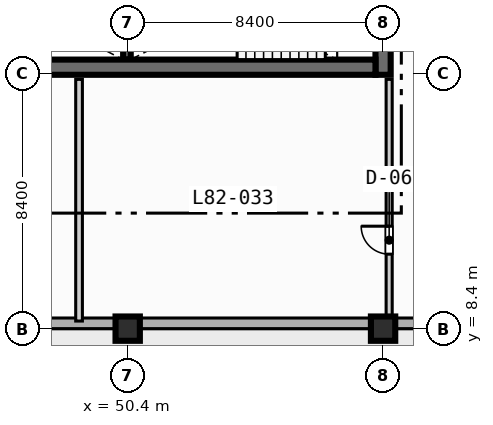
"""IFC4 building model, lengths in metres.
Left out: names, types, materials, properties, quantities, classifications, styles, units other than length and angle.
Written with IfcOpenShell. Run it as: python <this file> out.ifc"""

import sys

from ifc_helpers import new_model, si_unit, direction, frame, frame_2d, origin, origin_2d, place, context, subcontext, project, spatial, rectangle, extrude, element, fill, save


model = new_model("IFC4")
c1 = context("Model", 3, precision=1e-05, world=origin(), true_north=direction((0.0, 1.0)))
c2 = subcontext(c1, "Body", "Model", "MODEL_VIEW")
j1 = project(units=[si_unit("LENGTHUNIT", "METRE"), si_unit("PLANEANGLEUNIT", "RADIAN")], contexts=[c1])
p1 = place(None, origin())
s1 = spatial("IfcSite", under=j1, at=p1, CompositionType="ELEMENT")
p2 = place(p1, origin())
s2 = spatial("IfcBuilding", under=s1, at=p2, CompositionType="ELEMENT")
p3 = place(p2, frame((0.0, 0.0, 332.0)))
s3 = spatial("IfcBuildingStorey", under=s2, at=p3, CompositionType="ELEMENT", Elevation=332.0)
p4 = place(p3, frame((50.375, 17.25, 0.0), z_axis=(0.0, 0.0, 1.0), x_axis=(0.0, 1.0, 0.0)))
e1 = element("IfcWall", 1, at=p4, inside=s3, PredefinedType="SOLIDWALL", context=c2, shape_type="SweptSolid", body=[
    extrude(rectangle(XDim=3.5, YDim=0.25, at=frame_2d((1.75, 0.0))), origin(), (0.0, 0.0, 1.0), 3.67),
])
p5 = place(p3, frame((58.8, 16.75, 0.0), z_axis=(0.0, 0.0, 1.0), x_axis=(0.0, 1.0, 0.0)))
e2 = element("IfcWall", 2, at=p5, inside=s3, PredefinedType="SHEAR", context=c2, shape_type="SweptSolid", body=[
    extrude(rectangle(XDim=1.25, YDim=0.5, at=frame_2d((0.625, 0.0))), origin(), (0.0, 0.0, 1.0), 3.67),
])
p6 = place(p3, frame((42.2, 17.0, 0.0), z_axis=(0.0, 0.0, 1.0), x_axis=(1.0, 0.0, 0.0)))
e3 = element("IfcWall", 3, at=p6, inside=s3, PredefinedType="SHEAR", context=c2, shape_type="SweptSolid", body=[
    extrude(rectangle(XDim=16.35, YDim=0.5, at=frame_2d((8.175, 0.0))), origin(), (0.0, 0.0, 1.0), 3.67),
])
for number, where, z_axis, x_axis in (
    (4, (50.4, 8.4, 0.0), (0.0, 0.0, 1.0), (1.0, 0.0, 0.0)),
    (5, (58.8, 8.4, 0.0), (0.0, 0.0, 1.0), (1.0, 0.0, 0.0)),
):
    element("IfcColumn", number, at=place(p3, frame(where, z_axis=z_axis, x_axis=x_axis)), inside=s3, PredefinedType="COLUMN", context=c2, shape_type="SweptSolid", body=[
        extrude(rectangle(XDim=0.8, YDim=0.8, at=origin_2d()), origin(), (0.0, 0.0, 1.0), 3.9),
    ])
p7 = place(p3, frame((64.025, 8.575, 0.0), z_axis=(0.0, 0.0, 1.0), x_axis=(-1.0, 0.0, 0.0)))
e6 = element("IfcWall", 6, at=p7, inside=s3, PredefinedType="STANDARD", context=c2, shape_type="SweptSolid", body=[
    extrude(rectangle(XDim=52.45, YDim=0.35, at=frame_2d((26.225, 0.0))), origin(), (0.0, 0.0, 1.0), 3.67),
])
p8 = place(p7, frame((32.925, 0.0, 0.0)))
e7 = element("IfcOpeningElement", 7, at=p8, cuts=e6, PredefinedType="OPENING", context=c2, shape_type="SweptSolid", body=[
    extrude(rectangle(XDim=1.4, YDim=2.2, at=frame_2d((0.7, 1.1))), frame((0.0, 0.185, 0.0), z_axis=(0.0, -1.0, 0.0), x_axis=(1.0, 0.0, 0.0)), (0.0, 0.0, 1.0), 0.37),
])
p9 = place(p7, frame((41.825, 0.0, 0.85)))
e8 = element("IfcOpeningElement", 8, at=p9, cuts=e6, PredefinedType="OPENING", context=c2, shape_type="SweptSolid", body=[
    extrude(rectangle(XDim=2.4, YDim=1.95, at=frame_2d((1.2, 0.975))), frame((0.0, 0.185, 0.0), z_axis=(0.0, -1.0, 0.0), x_axis=(1.0, 0.0, 0.0)), (0.0, 0.0, 1.0), 0.37),
])
p10 = place(p7, frame((25.025, 0.0, 0.85)))
e9 = element("IfcOpeningElement", 9, at=p10, cuts=e6, PredefinedType="OPENING", context=c2, shape_type="SweptSolid", body=[
    extrude(rectangle(XDim=2.4, YDim=1.95, at=frame_2d((1.2, 0.975))), frame((0.0, 0.185, 0.0), z_axis=(0.0, -1.0, 0.0), x_axis=(1.0, 0.0, 0.0)), (0.0, 0.0, 1.0), 0.37),
])
p11 = place(p7, frame((16.925, 0.0, 0.85)))
e10 = element("IfcOpeningElement", 10, at=p11, cuts=e6, PredefinedType="OPENING", context=c2, shape_type="SweptSolid", body=[
    extrude(rectangle(XDim=1.8, YDim=1.8, at=frame_2d((0.9, 0.9))), frame((0.0, 0.185, 0.0), z_axis=(0.0, -1.0, 0.0), x_axis=(1.0, 0.0, 0.0)), (0.0, 0.0, 1.0), 0.37),
])
p12 = place(p7, frame((49.75, 0.0, 0.85)))
e11 = element("IfcOpeningElement", 11, at=p12, cuts=e6, PredefinedType="OPENING", context=c2, shape_type="SweptSolid", body=[
    extrude(rectangle(XDim=1.8, YDim=1.8, at=frame_2d((0.9, 0.9))), frame((0.0, 0.185, 0.0), z_axis=(0.0, -1.0, 0.0), x_axis=(1.0, 0.0, 0.0)), (0.0, 0.0, 1.0), 0.37),
])
p13 = place(p7, frame((47.89, 0.0, 0.85)))
e12 = element("IfcOpeningElement", 12, at=p13, cuts=e6, PredefinedType="OPENING", context=c2, shape_type="SweptSolid", body=[
    extrude(rectangle(XDim=0.72, YDim=1.8, at=frame_2d((0.36, 0.9))), frame((0.0, 0.185, 0.0), z_axis=(0.0, -1.0, 0.0), x_axis=(1.0, 0.0, 0.0)), (0.0, 0.0, 1.0), 0.37),
])
p14 = place(p7, frame((35.75, 0.0, 0.85)))
e13 = element("IfcOpeningElement", 13, at=p14, cuts=e6, PredefinedType="OPENING", context=c2, shape_type="SweptSolid", body=[
    extrude(rectangle(XDim=1.8, YDim=1.8, at=frame_2d((0.9, 0.9))), frame((0.0, 0.185, 0.0), z_axis=(0.0, -1.0, 0.0), x_axis=(1.0, 0.0, 0.0)), (0.0, 0.0, 1.0), 0.37),
])
p15 = place(p3, frame((59.0, 8.65, 0.0), z_axis=(0.0, 0.0, 1.0), x_axis=(0.0, 1.0, 0.0)))
e14 = element("IfcWall", 14, at=p15, inside=s3, PredefinedType="PARTITIONING", context=c2, shape_type="SweptSolid", body=[
    extrude(rectangle(XDim=7.95, YDim=0.2, at=frame_2d((3.975, 0.0))), origin(), (0.0, 0.0, 1.0), 3.36),
])
p16 = place(p15, frame((2.2, 0.0, 0.0)))
e15 = element("IfcOpeningElement", 15, at=p16, cuts=e14, PredefinedType="OPENING", context=c2, shape_type="SweptSolid", body=[
    extrude(rectangle(XDim=0.92, YDim=2.1, at=frame_2d((0.46, 1.05))), frame((0.0, 0.11, 0.0), z_axis=(0.0, -1.0, 0.0), x_axis=(1.0, 0.0, 0.0)), (0.0, 0.0, 1.0), 0.22),
])
p17 = place(p3, frame((48.8, 8.65, 0.0), z_axis=(0.0, 0.0, 1.0), x_axis=(0.0, 1.0, 0.0)))
e16 = element("IfcWall", 16, at=p17, inside=s3, PredefinedType="PARTITIONING", context=c2, shape_type="SweptSolid", body=[
    extrude(rectangle(XDim=7.95, YDim=0.22, at=frame_2d((3.975, 0.0))), origin(), (0.0, 0.0, 1.0), 3.67),
])
p18 = place(p16, origin())
e17 = element("IfcDoor", 17, at=p18, inside=s3, OperationType="SINGLE_SWING_RIGHT", PredefinedType="DOOR", context=c2, shape_type="SweptSolid", body=[
    extrude(rectangle(XDim=0.92, YDim=2.1, at=frame_2d((0.46, 1.05))), frame((0.0, 0.025, 0.0), z_axis=(0.0, -1.0, 0.0), x_axis=(1.0, 0.0, 0.0)), (0.0, 0.0, 1.0), 0.05),
])
fill(e15, e17)
save(model, sys.argv[1])
